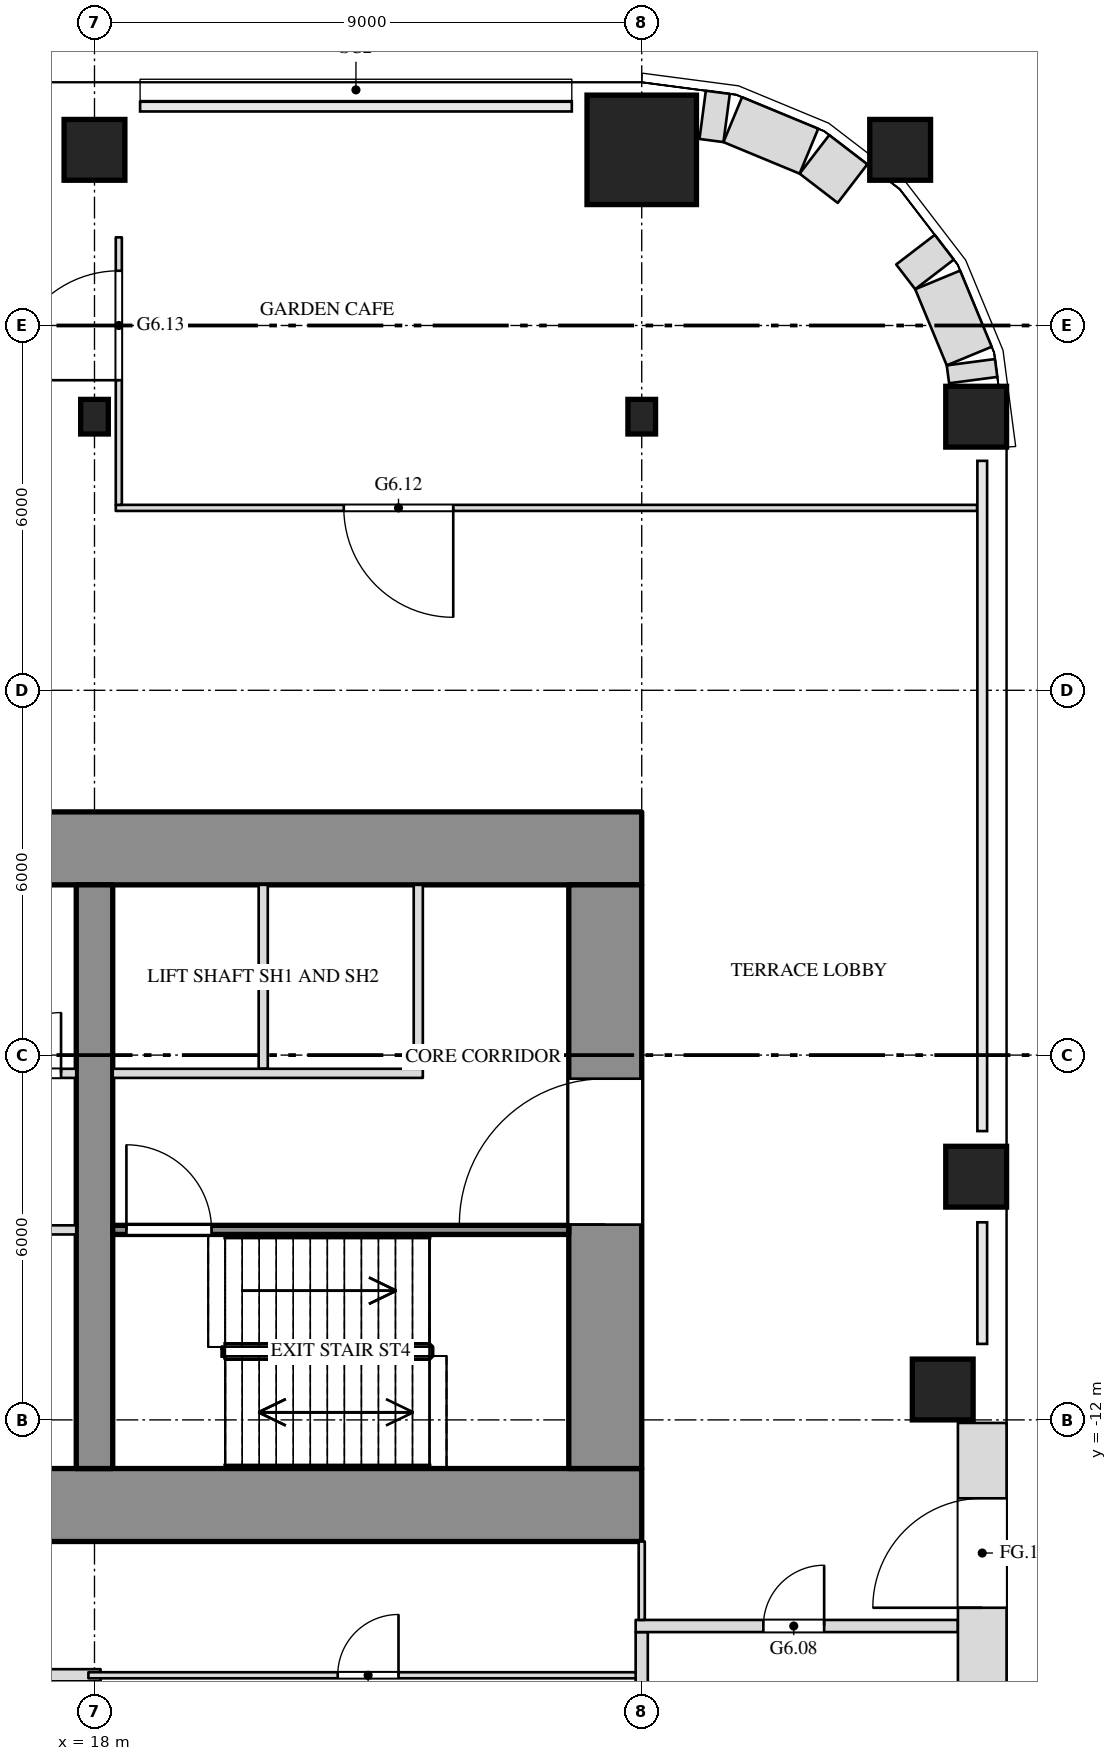
"""IFC4 building model, lengths in metres.
Left out: names, types, materials, properties, quantities, classifications, styles, units other than length and angle.
Written with IfcOpenShell. Run it as: python <this file> out.ifc"""

import sys

from ifc_helpers import new_model, si_unit, direction, frame, frame_2d, origin, origin_2d, place, context, subcontext, project, spatial, rectangle, i_section, extrude, clip, halfspace, element, fill, save


model = new_model("IFC4")
c1 = context("Model", 3, precision=1e-05, world=origin(), true_north=direction((0.0, 1.0)))
c2 = subcontext(c1, "Body", "Model", "MODEL_VIEW")
j1 = project(units=[si_unit("LENGTHUNIT", "METRE"), si_unit("PLANEANGLEUNIT", "RADIAN")], contexts=[c1])
p1 = place(None, origin())
s1 = spatial("IfcSite", under=j1, at=p1, CompositionType="ELEMENT")
p2 = place(p1, origin())
s2 = spatial("IfcBuilding", under=s1, at=p2, CompositionType="ELEMENT")
p3 = place(p2, frame((0.0, 0.0, 39.0)))
s3 = spatial("IfcBuildingStorey", under=s2, at=p3, CompositionType="ELEMENT", Elevation=39.0)
for number, where, z_axis, x_axis in (
    (1, (31.95, -11.5, 0.0), (0.0, 0.0, 1.0), (1.0, 0.0, 0.0)),
    (2, (32.5, -8.0, 0.0), (0.0, 0.0, 1.0), (1.0, 0.0, 0.0)),
):
    element("IfcColumn", number, at=place(p3, frame(where, z_axis=z_axis, x_axis=x_axis)), inside=s3, PredefinedType="COLUMN", context=c2, shape_type="SweptSolid", body=[
        extrude(rectangle(XDim=1.0, YDim=1.0, at=origin_2d()), origin(), (0.0, 0.0, 1.0), 4.5),
    ])
for number, where, z_axis, x_axis in (
    (3, (18.0, 4.5, 0.0), (0.0, 0.0, 1.0), (1.0, 0.0, 0.0)),
    (4, (27.0, 4.5, 0.0), (0.0, 0.0, 1.0), (1.0, 0.0, 0.0)),
):
    element("IfcColumn", number, at=place(p3, frame(where, z_axis=z_axis, x_axis=x_axis)), inside=s3, PredefinedType="COLUMN", context=c2, shape_type="SweptSolid", body=[
        extrude(i_section(OverallWidth=0.455, OverallDepth=0.569, WebThickness=0.078, FlangeThickness=0.125, at=origin_2d()), origin(), (0.0, 0.0, 1.0), 4.5),
    ])
p4 = place(p3, frame((32.5, 4.5, 0.0), z_axis=(0.0, 0.0, 1.0), x_axis=(1.0, 0.0, 0.0)))
e5 = element("IfcColumn", 5, at=p4, inside=s3, PredefinedType="COLUMN", context=c2, shape_type="SweptSolid", body=[
    extrude(rectangle(XDim=1.0, YDim=1.0, at=origin_2d()), origin(), (0.0, 0.0, 1.0), 4.5),
])
p5 = place(p3, frame((18.0, 8.0, 0.0), z_axis=(0.0, 0.595218167181, 0.80356414396), x_axis=(-1.0, 0.0, 0.0)))
e6 = element("IfcColumn", 6, at=p5, inside=s3, PredefinedType="COLUMN", context=c2, shape_type="Clipping", body=[
    clip(extrude(rectangle(XDim=1.0, YDim=1.0, at=origin_2d()), origin(), (0.0, 0.0, 1.0), 5.6), halfspace(frame((0.0, 0.0, 0.37)), True)),
])
p6 = place(p3, frame((27.0, 8.0, 0.0), z_axis=(0.0, 0.595218167181, 0.80356414396), x_axis=(-1.0, 0.0, 0.0)))
e7 = element("IfcColumn", 7, at=p6, inside=s3, PredefinedType="COLUMN", context=c2, shape_type="Clipping", body=[
    clip(extrude(rectangle(XDim=1.8, YDim=1.8, at=origin_2d()), origin(), (0.0, 0.0, 1.0), 5.6), halfspace(frame((0.0, 0.0, 0.667)), True)),
])
p7 = place(p3, frame((31.25, 8.0, 0.0), z_axis=(0.0, 0.595218167181, 0.80356414396), x_axis=(-1.0, 0.0, 0.0)))
e8 = element("IfcColumn", 8, at=p7, inside=s3, PredefinedType="COLUMN", context=c2, shape_type="Clipping", body=[
    clip(extrude(rectangle(XDim=1.0, YDim=1.0, at=origin_2d()), origin(), (0.0, 0.0, 1.0), 5.6), halfspace(frame((0.0, 0.0, 0.37)), True)),
])
p8 = place(p3, frame((-27.0, -2.6, 0.0), z_axis=(0.0, 0.0, 1.0), x_axis=(1.0, 0.0, 0.0)))
e9 = element("IfcWall", 9, at=p8, inside=s3, PredefinedType="SHEAR", context=c2, shape_type="SweptSolid", body=[
    extrude(rectangle(XDim=54.0, YDim=1.2, at=frame_2d((27.0, 0.0))), origin(), (0.0, 0.0, 1.0), 4.25),
])
p9 = place(p8, frame((15.15, 0.0, 0.0)))
e10 = element("IfcOpeningElement", 10, at=p9, cuts=e9, PredefinedType="OPENING", context=c2, shape_type="SweptSolid", body=[
    extrude(rectangle(XDim=2.4, YDim=2.1, at=frame_2d((1.2, 1.05))), frame((0.0, 0.612, 0.0), z_axis=(0.0, -1.0, 0.0), x_axis=(1.0, 0.0, 0.0)), (0.0, 0.0, 1.0), 1.224),
])
p10 = place(p8, frame((36.45, 0.0, 0.0)))
e11 = element("IfcOpeningElement", 11, at=p10, cuts=e9, PredefinedType="OPENING", context=c2, shape_type="SweptSolid", body=[
    extrude(rectangle(XDim=2.4, YDim=2.1, at=frame_2d((1.2, 1.05))), frame((0.0, 0.612, 0.0), z_axis=(0.0, -1.0, 0.0), x_axis=(1.0, 0.0, 0.0)), (0.0, 0.0, 1.0), 1.224),
])
p11 = place(p3, frame((-27.0, -13.4, 0.0), z_axis=(0.0, 0.0, 1.0), x_axis=(1.0, 0.0, 0.0)))
e12 = element("IfcWall", 12, at=p11, inside=s3, PredefinedType="SHEAR", context=c2, shape_type="SweptSolid", body=[
    extrude(rectangle(XDim=54.0, YDim=1.2, at=frame_2d((27.0, 0.0))), origin(), (0.0, 0.0, 1.0), 4.25),
])
p12 = place(p11, frame((16.45, 0.0, 0.0)))
e13 = element("IfcOpeningElement", 13, at=p12, cuts=e12, PredefinedType="OPENING", context=c2, shape_type="SweptSolid", body=[
    extrude(rectangle(XDim=1.0, YDim=2.1, at=frame_2d((0.5, 1.05))), frame((0.0, 0.612, 0.0), z_axis=(0.0, -1.0, 0.0), x_axis=(1.0, 0.0, 0.0)), (0.0, 0.0, 1.0), 1.224),
])
p13 = place(p11, frame((36.55, 0.0, 0.0)))
e14 = element("IfcOpeningElement", 14, at=p13, cuts=e12, PredefinedType="OPENING", context=c2, shape_type="SweptSolid", body=[
    extrude(rectangle(XDim=1.0, YDim=2.1, at=frame_2d((0.5, 1.05))), frame((0.0, 0.612, 0.0), z_axis=(0.0, -1.0, 0.0), x_axis=(1.0, 0.0, 0.0)), (0.0, 0.0, 1.0), 1.224),
])
p14 = place(p3, frame((26.4, -12.8, 0.0), z_axis=(0.0, 0.0, 1.0), x_axis=(0.0, 1.0, 0.0)))
e15 = element("IfcWall", 15, at=p14, inside=s3, PredefinedType="SHEAR", context=c2, shape_type="SweptSolid", body=[
    extrude(rectangle(XDim=9.6, YDim=1.2, at=frame_2d((4.8, 0.0))), origin(), (0.0, 0.0, 1.0), 4.25),
])
p15 = place(p14, frame((4.012, 0.0, 0.0)))
e16 = element("IfcOpeningElement", 16, at=p15, cuts=e15, PredefinedType="OPENING", context=c2, shape_type="SweptSolid", body=[
    extrude(rectangle(XDim=2.4, YDim=2.1, at=frame_2d((1.2, 1.05))), frame((0.0, 0.612, 0.0), z_axis=(0.0, -1.0, 0.0), x_axis=(1.0, 0.0, 0.0)), (0.0, 0.0, 1.0), 1.224),
])
p16 = place(p3, frame((18.0, -12.8, 0.0), z_axis=(0.0, 0.0, 1.0), x_axis=(0.0, 1.0, 0.0)))
e17 = element("IfcWall", 17, at=p16, inside=s3, PredefinedType="SHEAR", context=c2, shape_type="SweptSolid", body=[
    extrude(rectangle(XDim=9.6, YDim=0.6, at=frame_2d((4.8, 0.0))), origin(), (0.0, 0.0, 1.0), 4.25),
])
p17 = place(p3, frame((27.0, -17.0, 0.0), z_axis=(0.0, 0.0, 1.0), x_axis=(0.0, 1.0, 0.0)))
e18 = element("IfcWall", 18, at=p17, inside=s3, PredefinedType="PARTITIONING", context=c2, shape_type="SweptSolid", body=[
    extrude(rectangle(XDim=1.51, YDim=0.2, at=frame_2d((0.755, 0.0))), origin(), (0.0, 0.0, 1.0), 3.638),
])
p18 = place(p3, frame((-0.8, -16.2, 0.0), z_axis=(0.0, 0.0, 1.0), x_axis=(1.0, 0.0, 0.0)))
e19 = element("IfcWall", 19, at=p18, inside=s3, PredefinedType="PARTITIONING", context=c2, shape_type="SweptSolid", body=[
    extrude(rectangle(XDim=18.9, YDim=0.2, at=frame_2d((9.45, 0.0))), origin(), (0.0, 0.0, 1.0), 4.25),
])
p19 = place(p18, frame((4.8, 0.0, 0.0)))
e20 = element("IfcOpeningElement", 20, at=p19, cuts=e19, PredefinedType="OPENING", context=c2, shape_type="SweptSolid", body=[
    extrude(rectangle(XDim=1.0, YDim=2.1, at=frame_2d((0.5, 1.05))), frame((0.0, 0.112, 0.0), z_axis=(0.0, -1.0, 0.0), x_axis=(1.0, 0.0, 0.0)), (0.0, 0.0, 1.0), 0.224),
])
p20 = place(p18, frame((13.8, 0.0, 0.0)))
e21 = element("IfcOpeningElement", 21, at=p20, cuts=e19, PredefinedType="OPENING", context=c2, shape_type="SweptSolid", body=[
    extrude(rectangle(XDim=1.0, YDim=2.1, at=frame_2d((0.5, 1.05))), frame((0.0, 0.112, 0.0), z_axis=(0.0, -1.0, 0.0), x_axis=(1.0, 0.0, 0.0)), (0.0, 0.0, 1.0), 0.224),
])
p21 = place(p3, frame((17.9, -16.2, 0.0), z_axis=(0.0, 0.0, 1.0), x_axis=(1.0, 0.0, 0.0)))
e22 = element("IfcWall", 22, at=p21, inside=s3, PredefinedType="PARTITIONING", context=c2, shape_type="SweptSolid", body=[
    extrude(rectangle(XDim=9.0, YDim=0.1, at=frame_2d((4.5, 0.0))), origin(), (0.0, 0.0, 1.0), 4.25),
])
p22 = place(p21, frame((4.1, 0.0, 0.0)))
e23 = element("IfcOpeningElement", 23, at=p22, cuts=e22, PredefinedType="OPENING", context=c2, shape_type="SweptSolid", body=[
    extrude(rectangle(XDim=1.0, YDim=2.1, at=frame_2d((0.5, 1.05))), frame((0.0, 0.062, 0.0), z_axis=(0.0, -1.0, 0.0), x_axis=(1.0, 0.0, 0.0)), (0.0, 0.0, 1.0), 0.124),
])
p23 = place(p3, frame((26.9, -15.39, 0.0), z_axis=(0.0, 0.0, 1.0), x_axis=(1.0, 0.0, 0.0)))
e24 = element("IfcWall", 24, at=p23, inside=s3, PredefinedType="PARTITIONING", context=c2, shape_type="SweptSolid", body=[
    extrude(rectangle(XDim=5.3, YDim=0.2, at=frame_2d((2.65, 0.0))), origin(), (0.0, 0.0, 1.0), 4.25),
])
p24 = place(p23, frame((2.1, 0.0, 0.0)))
e25 = element("IfcOpeningElement", 25, at=p24, cuts=e24, PredefinedType="OPENING", context=c2, shape_type="SweptSolid", body=[
    extrude(rectangle(XDim=1.0, YDim=2.1, at=frame_2d((0.5, 1.05))), frame((0.0, 0.112, 0.0), z_axis=(0.0, -1.0, 0.0), x_axis=(1.0, 0.0, 0.0)), (0.0, 0.0, 1.0), 0.224),
])
p25 = place(p3, frame((27.0, -15.29, 0.0), z_axis=(0.0, 0.0, 1.0), x_axis=(0.0, 1.0, 0.0)))
e26 = element("IfcWall", 26, at=p25, inside=s3, PredefinedType="PARTITIONING", context=c2, shape_type="SweptSolid", body=[
    extrude(rectangle(XDim=1.29, YDim=0.1, at=frame_2d((0.645, 0.0))), origin(), (0.0, 0.0, 1.0), 3.638),
])
p26 = place(p3, frame((18.35, 3.0, 0.0), z_axis=(0.0, 0.0, 1.0), x_axis=(1.0, 0.0, 0.0)))
e27 = element("IfcWall", 27, at=p26, inside=s3, PredefinedType="PARTITIONING", context=c2, shape_type="SweptSolid", body=[
    extrude(rectangle(XDim=14.166, YDim=0.1, at=frame_2d((7.083, 0.0))), origin(), (0.0, 0.0, 1.0), 4.25),
])
p27 = place(p26, frame((3.75, 0.0, 0.0)))
e28 = element("IfcOpeningElement", 28, at=p27, cuts=e27, PredefinedType="OPENING", context=c2, shape_type="SweptSolid", body=[
    extrude(rectangle(XDim=1.8, YDim=2.1, at=frame_2d((0.9, 1.05))), frame((0.0, 0.062, 0.0), z_axis=(0.0, -1.0, 0.0), x_axis=(1.0, 0.0, 0.0)), (0.0, 0.0, 1.0), 0.124),
])
p28 = place(p3, frame((18.4, 3.05, 0.0), z_axis=(0.0, 0.0, 1.0), x_axis=(0.0, 1.0, 0.0)))
e29 = element("IfcWall", 29, at=p28, inside=s3, PredefinedType="PARTITIONING", context=c2, shape_type="SweptSolid", body=[
    extrude(rectangle(XDim=4.4, YDim=0.1, at=frame_2d((2.2, 0.0))), origin(), (0.0, 0.0, 1.0), 4.25),
])
p29 = place(p28, frame((2.05, 0.0, 0.0)))
e30 = element("IfcOpeningElement", 30, at=p29, cuts=e29, PredefinedType="OPENING", context=c2, shape_type="SweptSolid", body=[
    extrude(rectangle(XDim=1.8, YDim=2.1, at=frame_2d((0.9, 1.05))), frame((0.0, 0.062, 0.0), z_axis=(0.0, -1.0, 0.0), x_axis=(1.0, 0.0, 0.0)), (0.0, 0.0, 1.0), 0.124),
])
p30 = place(p3, frame((32.6, -16.784, 0.0), z_axis=(0.0, 0.0, 1.0), x_axis=(0.0, 1.0, 0.0)))
e31 = element("IfcWall", 31, at=p30, inside=s3, PredefinedType="SOLIDWALL", context=c2, shape_type="SweptSolid", body=[
    extrude(rectangle(XDim=4.734, YDim=0.8, at=frame_2d((2.367, 0.0))), origin(), (0.0, 0.0, 1.0), 4.25),
])
p31 = place(p30, frame((1.695, 0.0, 0.0)))
e32 = element("IfcOpeningElement", 32, at=p31, cuts=e31, PredefinedType="OPENING", context=c2, shape_type="SweptSolid", body=[
    extrude(rectangle(XDim=1.8, YDim=2.4, at=frame_2d((0.9, 1.2))), frame((0.0, 0.412, 0.0), z_axis=(0.0, -1.0, 0.0), x_axis=(1.0, 0.0, 0.0)), (0.0, 0.0, 1.0), 0.824),
])
p32 = place(p3, frame((32.451, 5.102, 0.0), z_axis=(0.0, 0.0, 1.0), x_axis=(-0.129901534033, 0.991526899008, 0.0)))
e33 = element("IfcWall", 33, at=p32, inside=s3, PredefinedType="SOLIDWALL", context=c2, shape_type="SweptSolid", body=[
    extrude(rectangle(XDim=0.297, YDim=0.8, at=frame_2d((0.148, 0.0))), origin(), (0.0, 0.0, 1.0), 4.25),
])
p33 = place(p3, frame((32.386, 5.497, 0.0), z_axis=(0.0, 0.0, 1.0), x_axis=(-0.38276009378, 0.923847774587, 0.0)))
e34 = element("IfcWall", 34, at=p33, inside=s3, PredefinedType="SOLIDWALL", context=c2, shape_type="SweptSolid", body=[
    extrude(rectangle(XDim=1.355, YDim=0.8, at=frame_2d((0.678, 0.0))), origin(), (0.0, 0.0, 1.0), 4.25),
])
p34 = place(p3, frame((31.815, 6.84, 0.0), z_axis=(0.0, 0.0, 1.0), x_axis=(-0.608721260779, 0.793384160843, 0.0)))
e35 = element("IfcWall", 35, at=p34, inside=s3, PredefinedType="SOLIDWALL", context=c2, shape_type="SweptSolid", body=[
    extrude(rectangle(XDim=0.513, YDim=0.8, at=frame_2d((0.256, 0.0))), origin(), (0.0, 0.0, 1.0), 4.25),
])
p35 = place(p3, frame((30.467, 8.334, 0.0), z_axis=(0.0, 0.0, 1.0), x_axis=(-0.793312797286, 0.608814262039, 0.0)))
e36 = element("IfcWall", 36, at=p35, inside=s3, PredefinedType="SOLIDWALL", context=c2, shape_type="SweptSolid", body=[
    extrude(rectangle(XDim=0.79, YDim=0.8, at=frame_2d((0.395, 0.0))), origin(), (0.0, 0.0, 1.0), 4.25),
])
p36 = place(p3, frame((29.75, 8.867, 0.0), z_axis=(0.0, 0.0, 1.0), x_axis=(-0.923847774587, 0.38276009378, 0.0)))
e37 = element("IfcWall", 37, at=p36, inside=s3, PredefinedType="SOLIDWALL", context=c2, shape_type="SweptSolid", body=[
    extrude(rectangle(XDim=1.355, YDim=0.8, at=frame_2d((0.678, 0.0))), origin(), (0.0, 0.0, 1.0), 4.25),
])
p37 = place(p3, frame((28.396, 9.413, 0.0), z_axis=(0.0, 0.0, 1.0), x_axis=(-0.99150434256, 0.130073589494, 0.0)))
e38 = element("IfcWall", 38, at=p37, inside=s3, PredefinedType="SOLIDWALL", context=c2, shape_type="SweptSolid", body=[
    extrude(rectangle(XDim=0.398, YDim=0.8, at=frame_2d((0.199, 0.0))), origin(), (0.0, 0.0, 1.0), 4.25),
])
for number, where, z_axis, x_axis in (
    (39, (20.775, -6.225, 0.0), (0.0, 0.0, 1.0), (0.0, 1.0, 0.0)),
    (40, (23.325, -6.225, 0.0), (0.0, 0.0, 1.0), (0.0, 1.0, 0.0)),
):
    element("IfcWall", number, at=place(p3, frame(where, z_axis=z_axis, x_axis=x_axis)), inside=s3, PredefinedType="PARTITIONING", context=c2, shape_type="SweptSolid", body=[
        extrude(rectangle(XDim=3.025, YDim=0.15, at=frame_2d((1.513, 0.0))), origin(), (0.0, 0.0, 1.0), 4.25),
    ])
p38 = place(p3, frame((12.0, -6.3, 0.0), z_axis=(0.0, 0.0, 1.0), x_axis=(1.0, 0.0, 0.0)))
e41 = element("IfcWall", 41, at=p38, inside=s3, PredefinedType="PARTITIONING", context=c2, shape_type="SweptSolid", body=[
    extrude(rectangle(XDim=5.7, YDim=0.15, at=frame_2d((2.85, 0.0))), origin(), (0.0, 0.0, 1.0), 4.25),
])
p39 = place(p38, frame((1.6, 0.0, 0.0)))
e42 = element("IfcOpeningElement", 42, at=p39, cuts=e41, PredefinedType="OPENING", context=c2, shape_type="SweptSolid", body=[
    extrude(rectangle(XDim=1.0, YDim=2.1, at=frame_2d((0.5, 1.05))), frame((0.0, 0.087, 0.0), z_axis=(0.0, -1.0, 0.0), x_axis=(1.0, 0.0, 0.0)), (0.0, 0.0, 1.0), 0.174),
])
p40 = place(p38, frame((4.45, 0.0, 0.0)))
e43 = element("IfcOpeningElement", 43, at=p40, cuts=e41, PredefinedType="OPENING", context=c2, shape_type="SweptSolid", body=[
    extrude(rectangle(XDim=1.0, YDim=2.1, at=frame_2d((0.5, 1.05))), frame((0.0, 0.087, 0.0), z_axis=(0.0, -1.0, 0.0), x_axis=(1.0, 0.0, 0.0)), (0.0, 0.0, 1.0), 0.174),
])
p41 = place(p3, frame((18.3, -6.3, 0.0), z_axis=(0.0, 0.0, 1.0), x_axis=(1.0, 0.0, 0.0)))
e44 = element("IfcWall", 44, at=p41, inside=s3, PredefinedType="PARTITIONING", context=c2, shape_type="SweptSolid", body=[
    extrude(rectangle(XDim=5.1, YDim=0.15, at=frame_2d((2.55, 0.0))), origin(), (0.0, 0.0, 1.0), 4.25),
])
p42 = place(p3, frame((10.8, -8.875, 0.0), z_axis=(0.0, 0.0, 1.0), x_axis=(1.0, 0.0, 0.0)))
e45 = element("IfcWall", 45, at=p42, inside=s3, PredefinedType="PARTITIONING", context=c2, shape_type="SweptSolid", body=[
    extrude(rectangle(XDim=6.9, YDim=0.15, at=frame_2d((3.45, 0.0))), origin(), (0.0, 0.0, 1.0), 4.25),
])
p43 = place(p42, frame((1.6, 0.0, 0.0)))
e46 = element("IfcOpeningElement", 46, at=p43, cuts=e45, PredefinedType="OPENING", context=c2, shape_type="SweptSolid", body=[
    extrude(rectangle(XDim=1.0, YDim=2.1, at=frame_2d((0.5, 1.05))), frame((0.0, 0.087, 0.0), z_axis=(0.0, -1.0, 0.0), x_axis=(1.0, 0.0, 0.0)), (0.0, 0.0, 1.0), 0.174),
])
p44 = place(p42, frame((4.45, 0.0, 0.0)))
e47 = element("IfcOpeningElement", 47, at=p44, cuts=e45, PredefinedType="OPENING", context=c2, shape_type="SweptSolid", body=[
    extrude(rectangle(XDim=1.0, YDim=2.1, at=frame_2d((0.5, 1.05))), frame((0.0, 0.087, 0.0), z_axis=(0.0, -1.0, 0.0), x_axis=(1.0, 0.0, 0.0)), (0.0, 0.0, 1.0), 0.174),
])
p45 = place(p3, frame((18.3, -8.875, 0.0), z_axis=(0.0, 0.0, 1.0), x_axis=(1.0, 0.0, 0.0)))
e48 = element("IfcWall", 48, at=p45, inside=s3, PredefinedType="SHEAR", context=c2, shape_type="SweptSolid", body=[
    extrude(rectangle(XDim=7.5, YDim=0.15, at=frame_2d((3.75, 0.0))), origin(), (0.0, 0.0, 1.0), 4.25),
])
p46 = place(p45, frame((0.225, 0.0, 0.0)))
e49 = element("IfcOpeningElement", 49, at=p46, cuts=e48, PredefinedType="OPENING", context=c2, shape_type="SweptSolid", body=[
    extrude(rectangle(XDim=1.4, YDim=2.1, at=frame_2d((0.7, 1.05))), frame((0.0, 0.087, 0.0), z_axis=(0.0, -1.0, 0.0), x_axis=(1.0, 0.0, 0.0)), (0.0, 0.0, 1.0), 0.174),
])
p47 = place(p22, origin())
e50 = element("IfcDoor", 50, at=p47, inside=s3, OperationType="SINGLE_SWING_RIGHT", PredefinedType="DOOR", context=c2, shape_type="SweptSolid", body=[
    extrude(rectangle(XDim=1.0, YDim=2.1, at=frame_2d((0.5, 1.05))), frame((0.0, 0.025, 0.0), z_axis=(0.0, -1.0, 0.0), x_axis=(1.0, 0.0, 0.0)), (0.0, 0.0, 1.0), 0.05),
])
fill(e23, e50)
p48 = place(p24, origin())
e51 = element("IfcDoor", 51, at=p48, inside=s3, OperationType="SINGLE_SWING_RIGHT", PredefinedType="DOOR", context=c2, shape_type="SweptSolid", body=[
    extrude(rectangle(XDim=1.0, YDim=2.1, at=frame_2d((0.5, 1.05))), frame((0.0, 0.025, 0.0), z_axis=(0.0, -1.0, 0.0), x_axis=(1.0, 0.0, 0.0)), (0.0, 0.0, 1.0), 0.05),
])
fill(e25, e51)
p49 = place(p27, origin())
e52 = element("IfcDoor", 52, at=p49, inside=s3, OperationType="DOUBLE_DOOR_SINGLE_SWING", PredefinedType="DOOR", context=c2, shape_type="SweptSolid", body=[
    extrude(rectangle(XDim=1.8, YDim=2.1, at=frame_2d((0.9, 1.05))), frame((0.0, 0.025, 0.0), z_axis=(0.0, -1.0, 0.0), x_axis=(1.0, 0.0, 0.0)), (0.0, 0.0, 1.0), 0.05),
])
fill(e28, e52)
p50 = place(p29, origin())
e53 = element("IfcDoor", 53, at=p50, inside=s3, OperationType="DOUBLE_DOOR_SINGLE_SWING", PredefinedType="DOOR", context=c2, shape_type="SweptSolid", body=[
    extrude(rectangle(XDim=1.8, YDim=2.1, at=frame_2d((0.9, 1.05))), frame((0.0, 0.025, 0.0), z_axis=(0.0, -1.0, 0.0), x_axis=(1.0, 0.0, 0.0)), (0.0, 0.0, 1.0), 0.05),
])
fill(e30, e53)
p51 = place(p31, origin())
e54 = element("IfcDoor", 54, at=p51, inside=s3, OperationType="DOUBLE_DOOR_SINGLE_SWING", PredefinedType="DOOR", context=c2, shape_type="SweptSolid", body=[
    extrude(rectangle(XDim=1.8, YDim=2.4, at=frame_2d((0.9, 1.2))), frame((0.0, 0.025, 0.0), z_axis=(0.0, -1.0, 0.0), x_axis=(1.0, 0.0, 0.0)), (0.0, 0.0, 1.0), 0.05),
])
fill(e32, e54)
p52 = place(p40, origin())
e55 = element("IfcDoor", 55, at=p52, inside=s3, OperationType="SINGLE_SWING_RIGHT", PredefinedType="DOOR", context=c2, shape_type="SweptSolid", body=[
    extrude(rectangle(XDim=1.0, YDim=2.1, at=frame_2d((0.5, 1.05))), frame((0.0, 0.025, 0.0), z_axis=(0.0, -1.0, 0.0), x_axis=(1.0, 0.0, 0.0)), (0.0, 0.0, 1.0), 0.05),
])
fill(e43, e55)
p53 = place(p46, origin())
e56 = element("IfcDoor", 56, at=p53, inside=s3, OperationType="DOUBLE_DOOR_SINGLE_SWING", PredefinedType="DOOR", context=c2, shape_type="SweptSolid", body=[
    extrude(rectangle(XDim=1.4, YDim=2.1, at=frame_2d((0.7, 1.05))), frame((0.0, 0.025, 0.0), z_axis=(0.0, -1.0, 0.0), x_axis=(1.0, 0.0, 0.0)), (0.0, 0.0, 1.0), 0.05),
])
fill(e49, e56)
p54 = place(p15, origin())
e57 = element("IfcDoor", 57, at=p54, inside=s3, OperationType="DOUBLE_DOOR_SINGLE_SWING", PredefinedType="DOOR", context=c2, shape_type="SweptSolid", body=[
    extrude(rectangle(XDim=2.4, YDim=2.1, at=frame_2d((1.2, 1.05))), frame((0.0, 0.025, 0.0), z_axis=(0.0, -1.0, 0.0), x_axis=(1.0, 0.0, 0.0)), (0.0, 0.0, 1.0), 0.05),
])
fill(e16, e57)
save(model, sys.argv[1])
